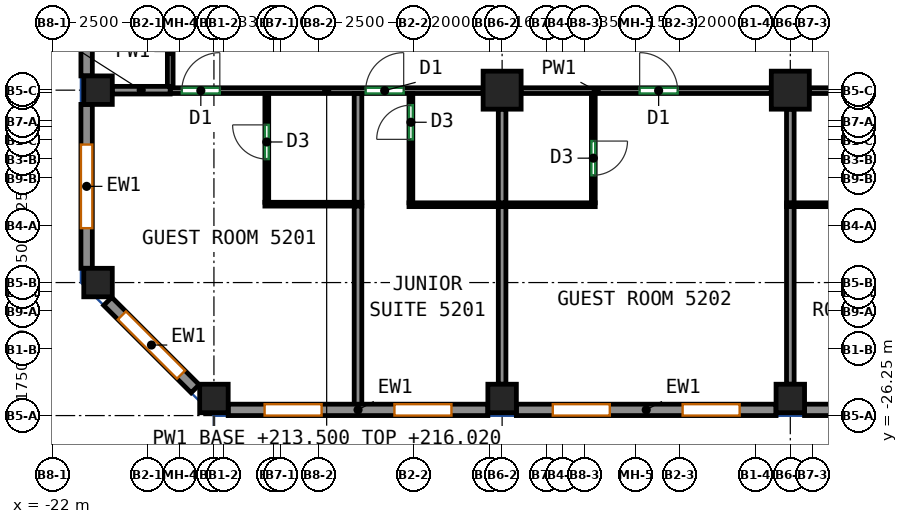
"""IFC4 building model, lengths in metres.
Left out: names, types, materials, properties, quantities, classifications, styles, units other than length and angle.
Written with IfcOpenShell. Run it as: python <this file> out.ifc"""

import sys

from ifc_helpers import new_model, si_unit, direction, frame, frame_2d, origin, origin_2d, place, context, subcontext, project, spatial, rectangle, extrude, source, transform, mapped, element, fill, save


model = new_model("IFC4")
c1 = context("Model", 3, precision=1e-05, world=origin(), true_north=direction((0.0, 1.0)))
c2 = subcontext(c1, "Body", "Model", "MODEL_VIEW")
j1 = project(units=[si_unit("LENGTHUNIT", "METRE"), si_unit("PLANEANGLEUNIT", "RADIAN")], contexts=[c1])
p1 = place(None, origin())
s1 = spatial("IfcSite", under=j1, at=p1, CompositionType="ELEMENT")
p2 = place(p1, origin())
s2 = spatial("IfcBuilding", under=s1, at=p2, CompositionType="ELEMENT")
p3 = place(p2, frame((0.0, 0.0, 213.5)))
s3 = spatial("IfcBuildingStorey", under=s2, at=p3, CompositionType="ELEMENT", Elevation=213.5)
m1 = source(origin(), c2, "Body", "SweptSolid", [
    extrude(rectangle(XDim=0.75, YDim=0.75, at=origin_2d()), origin(), (0.0, 0.0, 1.0), 3.12),
])
for number, where, z_axis, x_axis in (
    (1, (-20.8, -22.75, 0.0), (0.0, 0.0, 1.0), (1.0, 0.0, 0.0)),
    (2, (-20.8, -17.688, 0.0), (0.0, 0.0, 1.0), (1.0, 0.0, 0.0)),
    (3, (-17.75, -25.8, 0.0), (0.0, 0.0, 1.0), (1.0, 0.0, 0.0)),
    (4, (-10.167, -25.8, 0.0), (0.0, 0.0, 1.0), (1.0, 0.0, 0.0)),
):
    element("IfcColumn", number, at=place(p3, frame(where, z_axis=z_axis, x_axis=x_axis)), inside=s3, PredefinedType="COLUMN", context=c2, shape_type="MappedRepresentation", body=[
        mapped(m1, transform((0.0, 0.0, 0.0))),
    ])
m2 = source(origin(), c2, "Body", "SweptSolid", [
    extrude(rectangle(XDim=1.0, YDim=1.0, at=origin_2d()), origin(), (0.0, 0.0, 1.0), 3.12),
])
p4 = place(p3, frame((-10.167, -17.688, 0.0), z_axis=(0.0, 0.0, 1.0), x_axis=(1.0, 0.0, 0.0)))
e5 = element("IfcColumn", 5, at=p4, inside=s3, PredefinedType="COLUMN", context=c2, shape_type="MappedRepresentation", body=[
    mapped(m2, transform((0.0, 0.0, 0.0))),
])
p5 = place(p3, frame((-2.583, -25.8, 0.0), z_axis=(0.0, 0.0, 1.0), x_axis=(1.0, 0.0, 0.0)))
e6 = element("IfcColumn", 6, at=p5, inside=s3, PredefinedType="COLUMN", context=c2, shape_type="MappedRepresentation", body=[
    mapped(m1, transform((0.0, 0.0, 0.0))),
])
p6 = place(p3, frame((-2.583, -17.688, 0.0), z_axis=(0.0, 0.0, 1.0), x_axis=(1.0, 0.0, 0.0)))
e7 = element("IfcColumn", 7, at=p6, inside=s3, PredefinedType="COLUMN", context=c2, shape_type="MappedRepresentation", body=[
    mapped(m2, transform((0.0, 0.0, 0.0))),
])
m3 = source(origin(), c2, "Body", "SweptSolid", [
    extrude(rectangle(XDim=6.833, YDim=0.3, at=frame_2d((3.417, 0.0))), origin(), (0.0, 0.0, 1.0), 3.12),
])
p7 = place(p3, frame((-17.375, -26.1, 0.0), z_axis=(0.0, 0.0, 1.0), x_axis=(1.0, 0.0, 0.0)))
e8 = element("IfcWall", 8, at=p7, inside=s3, PredefinedType="SOLIDWALL", context=c2, shape_type="MappedRepresentation", body=[
    mapped(m3, transform((0.0, 0.0, 0.0))),
])
p8 = place(p7, frame((0.958, 0.0, 0.85)))
e9 = element("IfcOpeningElement", 9, at=p8, cuts=e8, PredefinedType="OPENING", context=c2, shape_type="SweptSolid", body=[
    extrude(rectangle(XDim=1.5, YDim=1.95, at=frame_2d((0.75, 0.975))), frame((0.0, 0.16, 0.0), z_axis=(0.0, -1.0, 0.0), x_axis=(1.0, 0.0, 0.0)), (0.0, 0.0, 1.0), 0.32),
])
p9 = place(p7, frame((4.375, 0.0, 0.85)))
e10 = element("IfcOpeningElement", 10, at=p9, cuts=e8, PredefinedType="OPENING", context=c2, shape_type="SweptSolid", body=[
    extrude(rectangle(XDim=1.5, YDim=1.95, at=frame_2d((0.75, 0.975))), frame((0.0, 0.16, 0.0), z_axis=(0.0, -1.0, 0.0), x_axis=(1.0, 0.0, 0.0)), (0.0, 0.0, 1.0), 0.32),
])
m4 = source(origin(), c2, "Body", "SweptSolid", [
    extrude(rectangle(XDim=6.833, YDim=0.3, at=frame_2d((3.417, 0.0))), origin(), (0.0, 0.0, 1.0), 3.12),
])
p10 = place(p3, frame((-9.792, -26.1, 0.0), z_axis=(0.0, 0.0, 1.0), x_axis=(1.0, 0.0, 0.0)))
e11 = element("IfcWall", 11, at=p10, inside=s3, PredefinedType="SOLIDWALL", context=c2, shape_type="MappedRepresentation", body=[
    mapped(m4, transform((0.0, 0.0, 0.0))),
])
p11 = place(p10, frame((0.958, 0.0, 0.85)))
e12 = element("IfcOpeningElement", 12, at=p11, cuts=e11, PredefinedType="OPENING", context=c2, shape_type="SweptSolid", body=[
    extrude(rectangle(XDim=1.5, YDim=1.95, at=frame_2d((0.75, 0.975))), frame((0.0, 0.16, 0.0), z_axis=(0.0, -1.0, 0.0), x_axis=(1.0, 0.0, 0.0)), (0.0, 0.0, 1.0), 0.32),
])
p12 = place(p10, frame((4.375, 0.0, 0.85)))
e13 = element("IfcOpeningElement", 13, at=p12, cuts=e11, PredefinedType="OPENING", context=c2, shape_type="SweptSolid", body=[
    extrude(rectangle(XDim=1.5, YDim=1.95, at=frame_2d((0.75, 0.975))), frame((0.0, 0.16, 0.0), z_axis=(0.0, -1.0, 0.0), x_axis=(1.0, 0.0, 0.0)), (0.0, 0.0, 1.0), 0.32),
])
p13 = place(p3, frame((-2.208, -26.1, 0.0), z_axis=(0.0, 0.0, 1.0), x_axis=(1.0, 0.0, 0.0)))
e14 = element("IfcWall", 14, at=p13, inside=s3, PredefinedType="SOLIDWALL", context=c2, shape_type="MappedRepresentation", body=[
    mapped(m3, transform((0.0, 0.0, 0.0))),
])
p14 = place(p13, frame((0.958, 0.0, 0.85)))
e15 = element("IfcOpeningElement", 15, at=p14, cuts=e14, PredefinedType="OPENING", context=c2, shape_type="SweptSolid", body=[
    extrude(rectangle(XDim=1.5, YDim=1.95, at=frame_2d((0.75, 0.975))), frame((0.0, 0.16, 0.0), z_axis=(0.0, -1.0, 0.0), x_axis=(1.0, 0.0, 0.0)), (0.0, 0.0, 1.0), 0.32),
])
p15 = place(p13, frame((4.375, 0.0, 0.85)))
e16 = element("IfcOpeningElement", 16, at=p15, cuts=e14, PredefinedType="OPENING", context=c2, shape_type="SweptSolid", body=[
    extrude(rectangle(XDim=1.5, YDim=1.95, at=frame_2d((0.75, 0.975))), frame((0.0, 0.16, 0.0), z_axis=(0.0, -1.0, 0.0), x_axis=(1.0, 0.0, 0.0)), (0.0, 0.0, 1.0), 0.32),
])
m5 = source(origin(), c2, "Body", "SweptSolid", [
    extrude(rectangle(XDim=7.812, YDim=0.3, at=frame_2d((3.906, 0.0))), origin(), (0.0, 0.0, 1.0), 3.12),
])
p16 = place(p3, frame((-21.1, -9.5, 0.0), z_axis=(0.0, 0.0, 1.0), x_axis=(0.0, -1.0, 0.0)))
e17 = element("IfcWall", 17, at=p16, inside=s3, PredefinedType="SOLIDWALL", context=c2, shape_type="MappedRepresentation", body=[
    mapped(m5, transform((0.0, 0.0, 0.0))),
])
p17 = place(p16, frame((0.853, 0.0, 0.85)))
e18 = element("IfcOpeningElement", 18, at=p17, cuts=e17, PredefinedType="OPENING", context=c2, shape_type="SweptSolid", body=[
    extrude(rectangle(XDim=2.2, YDim=1.95, at=frame_2d((1.1, 0.975))), frame((0.0, 0.16, 0.0), z_axis=(0.0, -1.0, 0.0), x_axis=(1.0, 0.0, 0.0)), (0.0, 0.0, 1.0), 0.32),
])
p18 = place(p16, frame((4.759, 0.0, 0.85)))
e19 = element("IfcOpeningElement", 19, at=p18, cuts=e17, PredefinedType="OPENING", context=c2, shape_type="SweptSolid", body=[
    extrude(rectangle(XDim=2.2, YDim=1.95, at=frame_2d((1.1, 0.975))), frame((0.0, 0.16, 0.0), z_axis=(0.0, -1.0, 0.0), x_axis=(1.0, 0.0, 0.0)), (0.0, 0.0, 1.0), 0.32),
])
m6 = source(origin(), c2, "Body", "SweptSolid", [
    extrude(rectangle(XDim=4.312, YDim=0.3, at=frame_2d((2.156, 0.0))), origin(), (0.0, 0.0, 1.0), 3.12),
])
p19 = place(p3, frame((-21.1, -18.062, 0.0), z_axis=(0.0, 0.0, 1.0), x_axis=(0.0, -1.0, 0.0)))
e20 = element("IfcWall", 20, at=p19, inside=s3, PredefinedType="SOLIDWALL", context=c2, shape_type="MappedRepresentation", body=[
    mapped(m6, transform((0.0, 0.0, 0.0))),
])
p20 = place(p19, frame((1.056, 0.0, 0.85)))
e21 = element("IfcOpeningElement", 21, at=p20, cuts=e20, PredefinedType="OPENING", context=c2, shape_type="SweptSolid", body=[
    extrude(rectangle(XDim=2.2, YDim=1.95, at=frame_2d((1.1, 0.975))), frame((0.0, 0.16, 0.0), z_axis=(0.0, -1.0, 0.0), x_axis=(1.0, 0.0, 0.0)), (0.0, 0.0, 1.0), 0.32),
])
m7 = source(origin(), c2, "Body", "SweptSolid", [
    extrude(rectangle(XDim=3.253, YDim=0.3, at=frame_2d((1.626, 0.0))), origin(), (0.0, 0.0, 1.0), 3.12),
])
p21 = place(p3, frame((-20.544, -23.244, 0.0), z_axis=(0.0, 0.0, 1.0), x_axis=(0.707106781187, -0.707106781187, 0.0)))
e22 = element("IfcWall", 22, at=p21, inside=s3, PredefinedType="SOLIDWALL", context=c2, shape_type="MappedRepresentation", body=[
    mapped(m7, transform((0.0, 0.0, 0.0))),
])
p22 = place(p21, frame((0.526, 0.0, 0.85)))
e23 = element("IfcOpeningElement", 23, at=p22, cuts=e22, PredefinedType="OPENING", context=c2, shape_type="SweptSolid", body=[
    extrude(rectangle(XDim=2.2, YDim=1.95, at=frame_2d((1.1, 0.975))), frame((0.0, 0.16, 0.0), z_axis=(0.0, -1.0, 0.0), x_axis=(1.0, 0.0, 0.0)), (0.0, 0.0, 1.0), 0.32),
])
p23 = place(p3, frame((-18.9, -17.7, 0.0), z_axis=(0.0, 0.0, 1.0), x_axis=(1.0, 0.0, 0.0)))
e24 = element("IfcWall", 24, at=p23, inside=s3, PredefinedType="PARTITIONING", context=c2, shape_type="SweptSolid", body=[
    extrude(rectangle(XDim=8.233, YDim=0.15, at=frame_2d((4.116, 0.0))), origin(), (0.0, 0.0, 1.0), 2.52),
])
p24 = place(p23, frame((0.305, 0.0, 0.0)))
e25 = element("IfcOpeningElement", 25, at=p24, cuts=e24, PredefinedType="OPENING", context=c2, shape_type="SweptSolid", body=[
    extrude(rectangle(XDim=1.0, YDim=2.1, at=frame_2d((0.5, 1.05))), frame((0.0, 0.085, 0.0), z_axis=(0.0, -1.0, 0.0), x_axis=(1.0, 0.0, 0.0)), (0.0, 0.0, 1.0), 0.17),
])
p25 = place(p23, frame((5.143, 0.0, 0.0)))
e26 = element("IfcOpeningElement", 26, at=p25, cuts=e24, PredefinedType="OPENING", context=c2, shape_type="SweptSolid", body=[
    extrude(rectangle(XDim=1.0, YDim=2.1, at=frame_2d((0.5, 1.05))), frame((0.0, 0.085, 0.0), z_axis=(0.0, -1.0, 0.0), x_axis=(1.0, 0.0, 0.0)), (0.0, 0.0, 1.0), 0.17),
])
p26 = place(p3, frame((-9.667, -17.7, 0.0), z_axis=(0.0, 0.0, 1.0), x_axis=(1.0, 0.0, 0.0)))
e27 = element("IfcWall", 27, at=p26, inside=s3, PredefinedType="PARTITIONING", context=c2, shape_type="SweptSolid", body=[
    extrude(rectangle(XDim=6.584, YDim=0.15, at=frame_2d((3.292, 0.0))), origin(), (0.0, 0.0, 1.0), 3.12),
])
p27 = place(p26, frame((3.119, 0.0, 0.0)))
e28 = element("IfcOpeningElement", 28, at=p27, cuts=e27, PredefinedType="OPENING", context=c2, shape_type="SweptSolid", body=[
    extrude(rectangle(XDim=1.0, YDim=2.1, at=frame_2d((0.5, 1.05))), frame((0.0, 0.085, 0.0), z_axis=(0.0, -1.0, 0.0), x_axis=(1.0, 0.0, 0.0)), (0.0, 0.0, 1.0), 0.17),
])
p28 = place(p3, frame((-2.083, -17.7, 0.0), z_axis=(0.0, 0.0, 1.0), x_axis=(1.0, 0.0, 0.0)))
e29 = element("IfcWall", 29, at=p28, inside=s3, PredefinedType="PARTITIONING", context=c2, shape_type="SweptSolid", body=[
    extrude(rectangle(XDim=6.583, YDim=0.15, at=frame_2d((3.292, 0.0))), origin(), (0.0, 0.0, 1.0), 3.12),
])
p29 = place(p28, frame((2.171, 0.0, 0.0)))
e30 = element("IfcOpeningElement", 30, at=p29, cuts=e29, PredefinedType="OPENING", context=c2, shape_type="SweptSolid", body=[
    extrude(rectangle(XDim=1.0, YDim=2.1, at=frame_2d((0.5, 1.05))), frame((0.0, 0.085, 0.0), z_axis=(0.0, -1.0, 0.0), x_axis=(1.0, 0.0, 0.0)), (0.0, 0.0, 1.0), 0.17),
])
p30 = place(p28, frame((3.543, 0.0, 0.0)))
e31 = element("IfcOpeningElement", 31, at=p30, cuts=e29, PredefinedType="OPENING", context=c2, shape_type="SweptSolid", body=[
    extrude(rectangle(XDim=1.0, YDim=2.1, at=frame_2d((0.5, 1.05))), frame((0.0, 0.085, 0.0), z_axis=(0.0, -1.0, 0.0), x_axis=(1.0, 0.0, 0.0)), (0.0, 0.0, 1.0), 0.17),
])
p31 = place(p3, frame((-18.9, -17.598, 0.0), z_axis=(0.0, 0.0, 1.0), x_axis=(0.0, 1.0, 0.0)))
e32 = element("IfcWall", 32, at=p31, inside=s3, PredefinedType="PARTITIONING", context=c2, shape_type="SweptSolid", body=[
    extrude(rectangle(XDim=1.855, YDim=0.15, at=frame_2d((0.927, 0.0))), origin(), (0.0, 0.0, 1.0), 3.12),
])
p32 = place(p3, frame((-16.359, -20.638, 0.0), z_axis=(0.0, 0.0, 1.0), x_axis=(0.0, 1.0, 0.0)))
e33 = element("IfcWall", 33, at=p32, inside=s3, PredefinedType="PARTITIONING", context=c2, shape_type="SweptSolid", body=[
    extrude(rectangle(XDim=2.861, YDim=0.1, at=frame_2d((1.43, 0.0))), origin(), (0.0, 0.0, 1.0), 3.12),
])
p33 = place(p32, frame((1.137, 0.0, 0.0)))
e34 = element("IfcOpeningElement", 34, at=p33, cuts=e33, PredefinedType="OPENING", context=c2, shape_type="SweptSolid", body=[
    extrude(rectangle(XDim=0.9, YDim=2.1, at=frame_2d((0.45, 1.05))), frame((0.0, 0.06, 0.0), z_axis=(0.0, -1.0, 0.0), x_axis=(1.0, 0.0, 0.0)), (0.0, 0.0, 1.0), 0.12),
])
p34 = place(p3, frame((-16.409, -20.688, 0.0), z_axis=(0.0, 0.0, 1.0), x_axis=(1.0, 0.0, 0.0)))
e35 = element("IfcWall", 35, at=p34, inside=s3, PredefinedType="PARTITIONING", context=c2, shape_type="SweptSolid", body=[
    extrude(rectangle(XDim=2.55, YDim=0.1, at=frame_2d((1.275, 0.0))), origin(), (0.0, 0.0, 1.0), 3.12),
])
p35 = place(p3, frame((-13.959, -26.0, 0.0), z_axis=(0.0, 0.0, 1.0), x_axis=(0.0, 1.0, 0.0)))
e36 = element("IfcWall", 36, at=p35, inside=s3, PredefinedType="PARTITIONING", context=c2, shape_type="SweptSolid", body=[
    extrude(rectangle(XDim=5.262, YDim=0.2, at=frame_2d((2.631, 0.0))), origin(), (0.0, 0.0, 1.0), 3.12),
])
p36 = place(p3, frame((-20.425, -17.688, 0.0), z_axis=(0.0, 0.0, 1.0), x_axis=(1.0, 0.0, 0.0)))
e37 = element("IfcWall", 37, at=p36, inside=s3, PredefinedType="PARTITIONING", context=c2, shape_type="SweptSolid", body=[
    extrude(rectangle(XDim=1.523, YDim=0.2, at=frame_2d((0.761, 0.0))), origin(), (0.0, 0.0, 1.0), 2.52),
])
p37 = place(p3, frame((-13.959, -20.638, 0.0), z_axis=(0.0, 0.0, 1.0), x_axis=(0.0, 1.0, 0.0)))
e38 = element("IfcWall", 38, at=p37, inside=s3, PredefinedType="PARTITIONING", context=c2, shape_type="SweptSolid", body=[
    extrude(rectangle(XDim=2.861, YDim=0.2, at=frame_2d((1.43, 0.0))), origin(), (0.0, 0.0, 1.0), 3.12),
])
p38 = place(p3, frame((-12.567, -20.652, 0.0), z_axis=(0.0, 0.0, 1.0), x_axis=(0.0, 1.0, 0.0)))
e39 = element("IfcWall", 39, at=p38, inside=s3, PredefinedType="PARTITIONING", context=c2, shape_type="SweptSolid", body=[
    extrude(rectangle(XDim=2.875, YDim=0.1, at=frame_2d((1.438, 0.0))), origin(), (0.0, 0.0, 1.0), 3.12),
])
p39 = place(p38, frame((1.67, 0.0, 0.0)))
e40 = element("IfcOpeningElement", 40, at=p39, cuts=e39, PredefinedType="OPENING", context=c2, shape_type="SweptSolid", body=[
    extrude(rectangle(XDim=0.9, YDim=2.1, at=frame_2d((0.45, 1.05))), frame((0.0, 0.06, 0.0), z_axis=(0.0, -1.0, 0.0), x_axis=(1.0, 0.0, 0.0)), (0.0, 0.0, 1.0), 0.12),
])
p40 = place(p3, frame((-12.617, -20.702, 0.0), z_axis=(0.0, 0.0, 1.0), x_axis=(1.0, 0.0, 0.0)))
e41 = element("IfcWall", 41, at=p40, inside=s3, PredefinedType="PARTITIONING", context=c2, shape_type="SweptSolid", body=[
    extrude(rectangle(XDim=4.9, YDim=0.1, at=frame_2d((2.45, 0.0))), origin(), (0.0, 0.0, 1.0), 3.12),
])
p41 = place(p3, frame((-10.167, -25.425, 0.0), z_axis=(0.0, 0.0, 1.0), x_axis=(0.0, 1.0, 0.0)))
e42 = element("IfcWall", 42, at=p41, inside=s3, PredefinedType="PARTITIONING", context=c2, shape_type="SweptSolid", body=[
    extrude(rectangle(XDim=4.673, YDim=0.2, at=frame_2d((2.336, 0.0))), origin(), (0.0, 0.0, 1.0), 3.12),
])
p42 = place(p3, frame((-10.167, -20.652, 0.0), z_axis=(0.0, 0.0, 1.0), x_axis=(0.0, 1.0, 0.0)))
e43 = element("IfcWall", 43, at=p42, inside=s3, PredefinedType="PARTITIONING", context=c2, shape_type="SweptSolid", body=[
    extrude(rectangle(XDim=2.464, YDim=0.2, at=frame_2d((1.232, 0.0))), origin(), (0.0, 0.0, 1.0), 3.12),
])
p43 = place(p3, frame((-7.767, -17.777, 0.0), z_axis=(0.0, 0.0, 1.0), x_axis=(0.0, -1.0, 0.0)))
e44 = element("IfcWall", 44, at=p43, inside=s3, PredefinedType="PARTITIONING", context=c2, shape_type="SweptSolid", body=[
    extrude(rectangle(XDim=2.875, YDim=0.1, at=frame_2d((1.438, 0.0))), origin(), (0.0, 0.0, 1.0), 3.12),
])
p44 = place(p43, frame((1.25, 0.0, 0.0)))
e45 = element("IfcOpeningElement", 45, at=p44, cuts=e44, PredefinedType="OPENING", context=c2, shape_type="SweptSolid", body=[
    extrude(rectangle(XDim=0.9, YDim=2.1, at=frame_2d((0.45, 1.05))), frame((0.0, 0.06, 0.0), z_axis=(0.0, -1.0, 0.0), x_axis=(1.0, 0.0, 0.0)), (0.0, 0.0, 1.0), 0.12),
])
p45 = place(p3, frame((-2.583, -25.425, 0.0), z_axis=(0.0, 0.0, 1.0), x_axis=(0.0, 1.0, 0.0)))
e46 = element("IfcWall", 46, at=p45, inside=s3, PredefinedType="PARTITIONING", context=c2, shape_type="SweptSolid", body=[
    extrude(rectangle(XDim=4.683, YDim=0.2, at=frame_2d((2.342, 0.0))), origin(), (0.0, 0.0, 1.0), 3.12),
])
p46 = place(p3, frame((-2.583, -20.662, 0.0), z_axis=(0.0, 0.0, 1.0), x_axis=(0.0, 1.0, 0.0)))
e47 = element("IfcWall", 47, at=p46, inside=s3, PredefinedType="PARTITIONING", context=c2, shape_type="SweptSolid", body=[
    extrude(rectangle(XDim=2.474, YDim=0.2, at=frame_2d((1.237, 0.0))), origin(), (0.0, 0.0, 1.0), 3.12),
])
p47 = place(p3, frame((-2.683, -20.702, 0.0), z_axis=(0.0, 0.0, 1.0), x_axis=(1.0, 0.0, 0.0)))
e48 = element("IfcWall", 48, at=p47, inside=s3, PredefinedType="PARTITIONING", context=c2, shape_type="SweptSolid", body=[
    extrude(rectangle(XDim=2.55, YDim=0.1, at=frame_2d((1.275, 0.0))), origin(), (0.0, 0.0, 1.0), 3.12),
])
p48 = place(p8, origin())
e49 = element("IfcWindow", 49, at=p48, inside=s3, PartitioningType="SINGLE_PANEL", PredefinedType="WINDOW", context=c2, shape_type="SweptSolid", body=[
    extrude(rectangle(XDim=1.5, YDim=1.95, at=frame_2d((0.75, 0.975))), frame((0.0, 0.03, 0.0), z_axis=(0.0, -1.0, 0.0), x_axis=(1.0, 0.0, 0.0)), (0.0, 0.0, 1.0), 0.06),
])
fill(e9, e49)
p49 = place(p9, origin())
e50 = element("IfcWindow", 50, at=p49, inside=s3, PartitioningType="SINGLE_PANEL", PredefinedType="WINDOW", context=c2, shape_type="SweptSolid", body=[
    extrude(rectangle(XDim=1.5, YDim=1.95, at=frame_2d((0.75, 0.975))), frame((0.0, 0.03, 0.0), z_axis=(0.0, -1.0, 0.0), x_axis=(1.0, 0.0, 0.0)), (0.0, 0.0, 1.0), 0.06),
])
fill(e10, e50)
p50 = place(p11, origin())
e51 = element("IfcWindow", 51, at=p50, inside=s3, PartitioningType="SINGLE_PANEL", PredefinedType="WINDOW", context=c2, shape_type="SweptSolid", body=[
    extrude(rectangle(XDim=1.5, YDim=1.95, at=frame_2d((0.75, 0.975))), frame((0.0, 0.03, 0.0), z_axis=(0.0, -1.0, 0.0), x_axis=(1.0, 0.0, 0.0)), (0.0, 0.0, 1.0), 0.06),
])
fill(e12, e51)
p51 = place(p12, origin())
e52 = element("IfcWindow", 52, at=p51, inside=s3, PartitioningType="SINGLE_PANEL", PredefinedType="WINDOW", context=c2, shape_type="SweptSolid", body=[
    extrude(rectangle(XDim=1.5, YDim=1.95, at=frame_2d((0.75, 0.975))), frame((0.0, 0.03, 0.0), z_axis=(0.0, -1.0, 0.0), x_axis=(1.0, 0.0, 0.0)), (0.0, 0.0, 1.0), 0.06),
])
fill(e13, e52)
p52 = place(p20, origin())
e53 = element("IfcWindow", 53, at=p52, inside=s3, PartitioningType="SINGLE_PANEL", PredefinedType="WINDOW", context=c2, shape_type="SweptSolid", body=[
    extrude(rectangle(XDim=2.2, YDim=1.95, at=frame_2d((1.1, 0.975))), frame((0.0, 0.03, 0.0), z_axis=(0.0, -1.0, 0.0), x_axis=(1.0, 0.0, 0.0)), (0.0, 0.0, 1.0), 0.06),
])
fill(e21, e53)
p53 = place(p22, origin())
e54 = element("IfcWindow", 54, at=p53, inside=s3, PartitioningType="SINGLE_PANEL", PredefinedType="WINDOW", context=c2, shape_type="SweptSolid", body=[
    extrude(rectangle(XDim=2.2, YDim=1.95, at=frame_2d((1.1, 0.975))), frame((0.0, 0.03, 0.0), z_axis=(0.0, -1.0, 0.0), x_axis=(1.0, 0.0, 0.0)), (0.0, 0.0, 1.0), 0.06),
])
fill(e23, e54)
p54 = place(p44, origin())
e55 = element("IfcDoor", 55, at=p54, inside=s3, OperationType="SINGLE_SWING_LEFT", PredefinedType="DOOR", context=c2, shape_type="SweptSolid", body=[
    extrude(rectangle(XDim=0.9, YDim=2.1, at=frame_2d((0.45, 1.05))), frame((0.0, 0.025, 0.0), z_axis=(0.0, -1.0, 0.0), x_axis=(1.0, 0.0, 0.0)), (0.0, 0.0, 1.0), 0.05),
])
fill(e45, e55)
p55 = place(p33, origin())
e56 = element("IfcDoor", 56, at=p55, inside=s3, OperationType="SINGLE_SWING_RIGHT", PredefinedType="DOOR", context=c2, shape_type="SweptSolid", body=[
    extrude(rectangle(XDim=0.9, YDim=2.1, at=frame_2d((0.45, 1.05))), frame((0.0, 0.025, 0.0), z_axis=(0.0, -1.0, 0.0), x_axis=(1.0, 0.0, 0.0)), (0.0, 0.0, 1.0), 0.05),
])
fill(e34, e56)
p56 = place(p39, origin())
e57 = element("IfcDoor", 57, at=p56, inside=s3, OperationType="SINGLE_SWING_LEFT", PredefinedType="DOOR", context=c2, shape_type="SweptSolid", body=[
    extrude(rectangle(XDim=0.9, YDim=2.1, at=frame_2d((0.45, 1.05))), frame((0.0, 0.025, 0.0), z_axis=(0.0, -1.0, 0.0), x_axis=(1.0, 0.0, 0.0)), (0.0, 0.0, 1.0), 0.05),
])
fill(e40, e57)
p57 = place(p24, origin())
e58 = element("IfcDoor", 58, at=p57, inside=s3, OperationType="SINGLE_SWING_RIGHT", PredefinedType="DOOR", context=c2, shape_type="SweptSolid", body=[
    extrude(rectangle(XDim=1.0, YDim=2.1, at=frame_2d((0.5, 1.05))), frame((0.0, 0.025, 0.0), z_axis=(0.0, -1.0, 0.0), x_axis=(1.0, 0.0, 0.0)), (0.0, 0.0, 1.0), 0.05),
])
fill(e25, e58)
p58 = place(p25, origin())
e59 = element("IfcDoor", 59, at=p58, inside=s3, OperationType="SINGLE_SWING_RIGHT", PredefinedType="DOOR", context=c2, shape_type="SweptSolid", body=[
    extrude(rectangle(XDim=1.0, YDim=2.1, at=frame_2d((0.5, 1.05))), frame((0.0, 0.025, 0.0), z_axis=(0.0, -1.0, 0.0), x_axis=(1.0, 0.0, 0.0)), (0.0, 0.0, 1.0), 0.05),
])
fill(e26, e59)
p59 = place(p27, origin())
e60 = element("IfcDoor", 60, at=p59, inside=s3, OperationType="SINGLE_SWING_LEFT", PredefinedType="DOOR", context=c2, shape_type="SweptSolid", body=[
    extrude(rectangle(XDim=1.0, YDim=2.1, at=frame_2d((0.5, 1.05))), frame((0.0, 0.025, 0.0), z_axis=(0.0, -1.0, 0.0), x_axis=(1.0, 0.0, 0.0)), (0.0, 0.0, 1.0), 0.05),
])
fill(e28, e60)
save(model, sys.argv[1])
